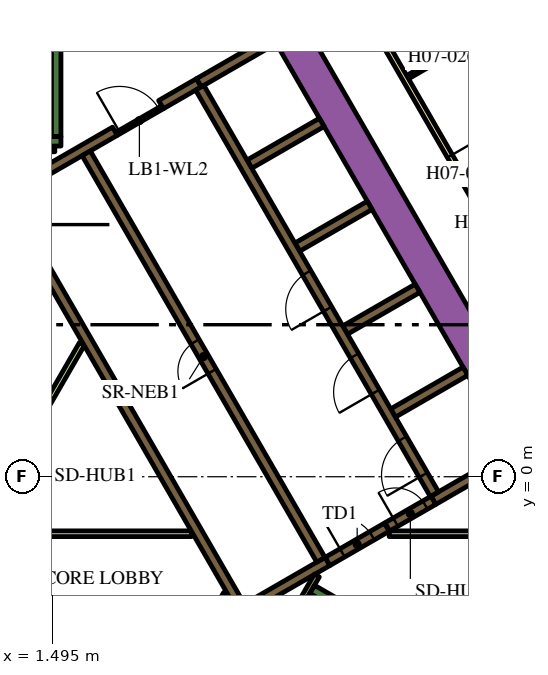
"""IFC4 building model, lengths in metres.
Left out: names, types, materials, properties, quantities, classifications, styles, units other than length and angle.
Written with IfcOpenShell. Run it as: python <this file> out.ifc"""

import sys

from ifc_helpers import new_model, si_unit, direction, frame, frame_2d, origin, place, context, subcontext, project, spatial, polyline, rectangle, outline, extrude, element, fill, save


model = new_model("IFC4")
c1 = context("Model", 3, precision=1e-05, world=origin(), true_north=direction((0.0, 1.0)))
c2 = subcontext(c1, "Body", "Model", "MODEL_VIEW")
j1 = project(units=[si_unit("LENGTHUNIT", "METRE"), si_unit("PLANEANGLEUNIT", "RADIAN")], contexts=[c1])
p1 = place(None, origin())
s1 = spatial("IfcSite", under=j1, at=p1, CompositionType="ELEMENT")
p2 = place(p1, origin())
s2 = spatial("IfcBuilding", under=s1, at=p2, CompositionType="ELEMENT")
p3 = place(p2, frame((0.0, 0.0, 95.4)))
s3 = spatial("IfcBuildingStorey", under=s2, at=p3, CompositionType="ELEMENT", Elevation=95.4)
p4 = place(p3, frame((6.776, 13.364, 0.0), z_axis=(0.0, 0.0, 1.0), x_axis=(0.500004177138, -0.8660229921, 0.0)))
e1 = element("IfcWall", 1, at=p4, inside=s3, PredefinedType="SOLIDWALL", context=c2, shape_type="SweptSolid", body=[
    extrude(rectangle(XDim=20.204, YDim=0.9, at=frame_2d((10.102, 0.0))), origin(), (0.0, 0.0, 1.0), 3.9),
])
p5 = place(p3, frame((8.334, -2.964, 0.0), z_axis=(0.0, 0.0, 1.0), x_axis=(0.866016039709, -0.500016218704, 0.0)))
e2 = element("IfcWall", 2, at=p5, inside=s3, PredefinedType="SOLIDWALL", context=c2, shape_type="SweptSolid", body=[
    extrude(rectangle(XDim=7.05, YDim=0.25, at=frame_2d((3.525, 0.0))), origin(), (0.0, 0.0, 1.0), 3.9),
])
p6 = place(p3, frame((8.168, -3.503, 0.0), z_axis=(0.0, 0.0, 1.0), x_axis=(0.49972245349, 0.866185586049, 0.0)))
e3 = element("IfcWall", 3, at=p6, inside=s3, PredefinedType="SOLIDWALL", context=c2, shape_type="SweptSolid", body=[
    extrude(rectangle(XDim=0.425, YDim=0.25, at=frame_2d((0.212, 0.0))), origin(), (0.0, 0.0, 1.0), 3.9),
])
p7 = place(p3, frame((1.6, 8.95, 0.0), z_axis=(0.0, 0.0, 1.0), x_axis=(0.0, 1.0, 0.0)))
e4 = element("IfcWall", 4, at=p7, inside=s3, PredefinedType="SOLIDWALL", context=c2, shape_type="SweptSolid", body=[
    extrude(rectangle(XDim=6.8, YDim=0.25, at=frame_2d((3.4, 0.0))), origin(), (0.0, 0.0, 1.0), 3.9),
])
p8 = place(p3, frame((1.05, 8.825, 0.0), z_axis=(0.0, 0.0, 1.0), x_axis=(1.0, 0.0, 0.0)))
e5 = element("IfcWall", 5, at=p8, inside=s3, PredefinedType="SOLIDWALL", context=c2, shape_type="SweptSolid", body=[
    extrude(rectangle(XDim=0.675, YDim=0.25, at=frame_2d((0.337, 0.0))), origin(), (0.0, 0.0, 1.0), 3.9),
])
p9 = place(p3, frame((10.464, 1.677, 0.0), z_axis=(0.0, 0.0, 1.0), x_axis=(0.86605622881, 0.499946605688, 0.0)))
e6 = element("IfcWall", 6, at=p9, inside=s3, PredefinedType="SOLIDWALL", context=c2, shape_type="SweptSolid", body=[
    extrude(rectangle(XDim=2.2, YDim=0.25, at=frame_2d((1.1, 0.0))), origin(), (0.0, 0.0, 1.0), 3.9),
])
p10 = place(p3, frame((13.629, 0.594, 0.0), z_axis=(0.0, 0.0, 1.0), x_axis=(-0.866063384774, -0.499934209226, 0.0)))
e7 = element("IfcWall", 7, at=p10, inside=s3, PredefinedType="SOLIDWALL", context=c2, shape_type="SweptSolid", body=[
    extrude(rectangle(XDim=2.428, YDim=0.25, at=frame_2d((1.214, 0.0))), origin(), (0.0, 0.0, 1.0), 3.9),
])
p11 = place(p3, origin())
e8 = element("IfcWall", 8, at=p11, inside=s3, PredefinedType="SOLIDWALL", context=c2, shape_type="SweptSolid", body=[
    extrude(outline(polyline([(0.566, 6.725), (0.566, 6.875), (0.566, 6.875), (0.565, 6.875), (0.361, 6.875), (0.035, 7.439), (0.252, 7.564), (0.377, 7.348), (6.552, -3.348), (6.677, -3.564), (6.46, -3.689), (0.448, 6.725), (0.565, 6.725), (0.566, 6.725), (0.566, 6.725)])), origin(), (0.0, 0.0, 1.0), 3.9),
])
p12 = place(p3, frame((4.358, 9.791, 0.0), z_axis=(0.0, 0.0, 1.0), x_axis=(0.866079547155, 0.499906209203, 0.0)))
e9 = element("IfcWall", 9, at=p12, inside=s3, PredefinedType="SOLIDWALL", context=c2, shape_type="SweptSolid", body=[
    extrude(rectangle(XDim=1.15, YDim=0.25, at=frame_2d((0.575, 0.0))), origin(), (0.0, 0.0, 1.0), 3.9),
])
p13 = place(p3, frame((5.356, 10.367, 0.0), z_axis=(0.0, 0.0, 1.0), x_axis=(0.865978535641, 0.50008116922, 0.0)))
e10 = element("IfcWall", 10, at=p13, inside=s3, PredefinedType="SOLIDWALL", context=c2, shape_type="SweptSolid", body=[
    extrude(rectangle(XDim=2.278, YDim=0.25, at=frame_2d((1.139, 0.0))), origin(), (0.0, 0.0, 1.0), 3.9),
])
p14 = place(p3, frame((0.314, 7.456, 0.0), z_axis=(0.0, 0.0, 1.0), x_axis=(0.866013897511, 0.50001992892, 0.0)))
e11 = element("IfcWall", 11, at=p14, inside=s3, PredefinedType="SOLIDWALL", context=c2, shape_type="SweptSolid", body=[
    extrude(rectangle(XDim=3.268, YDim=0.25, at=frame_2d((1.634, 0.0))), origin(), (0.0, 0.0, 1.0), 3.9),
])
p15 = place(p3, frame((6.614, -3.456, 0.0), z_axis=(0.0, 0.0, 1.0), x_axis=(0.866031582473, 0.499989298045, 0.0)))
e12 = element("IfcWall", 12, at=p15, inside=s3, PredefinedType="SOLIDWALL", context=c2, shape_type="SweptSolid", body=[
    extrude(rectangle(XDim=2.455, YDim=0.25, at=frame_2d((1.228, 0.0))), origin(), (0.0, 0.0, 1.0), 3.9),
])
for number, where, z_axis, x_axis in (
    (13, (6.684, 8.224, 0.0), (0.0, 0.0, 1.0), (0.866, 0.5, 0.0)),
    (14, (7.944, 6.041, 0.0), (0.0, 0.0, 1.0), (0.866, 0.5, 0.0)),
    (15, (9.204, 3.859, 0.0), (0.0, 0.0, 1.0), (0.866, 0.5, 0.0)),
):
    element("IfcWall", number, at=place(p3, frame(where, z_axis=z_axis, x_axis=x_axis)), inside=s3, PredefinedType="SOLIDWALL", context=c2, shape_type="SweptSolid", body=[
        extrude(rectangle(XDim=2.2, YDim=0.25, at=frame_2d((1.1, 0.0))), origin(), (0.0, 0.0, 1.0), 3.9),
    ])
p16 = place(p3, frame((5.705, -3.718, 0.0), z_axis=(0.0, 0.0, 1.0), x_axis=(0.499962090823, 0.866047289552, 0.0)))
e16 = element("IfcWall", 16, at=p16, inside=s3, PredefinedType="PARTITIONING", context=c2, shape_type="SweptSolid", body=[
    extrude(rectangle(XDim=0.735, YDim=0.15, at=frame_2d((0.367, 0.0))), origin(), (0.0, 0.0, 1.0), 2.75),
])
p17 = place(p3, frame((8.459, -2.599, 0.0), z_axis=(0.0, 0.0, 1.0), x_axis=(-0.500041054325, -0.866001699761, 0.0)))
e17 = element("IfcWall", 17, at=p17, inside=s3, PredefinedType="PARTITIONING", context=c2, shape_type="SweptSolid", body=[
    extrude(rectangle(XDim=0.929, YDim=0.15, at=frame_2d((0.464, 0.0))), origin(), (0.0, 0.0, 1.0), 3.9),
])
p18 = place(p3, frame((10.362, -1.5, 0.0), z_axis=(0.0, 0.0, 1.0), x_axis=(1.0, 0.0, 0.0)))
e18 = element("IfcWall", 18, at=p18, inside=s3, PredefinedType="PARTITIONING", context=c2, shape_type="SweptSolid", body=[
    extrude(rectangle(XDim=4.439, YDim=0.15, at=frame_2d((2.22, 0.0))), origin(), (0.0, 0.0, 1.0), 2.75),
])
p19 = place(p3, frame((-4.2, -1.5, 0.0), z_axis=(0.0, 0.0, 1.0), x_axis=(1.0, 0.0, 0.0)))
e19 = element("IfcWall", 19, at=p19, inside=s3, PredefinedType="PARTITIONING", context=c2, shape_type="SweptSolid", body=[
    extrude(rectangle(XDim=9.359, YDim=0.15, at=frame_2d((4.68, 0.0))), origin(), (0.0, 0.0, 1.0), 2.75),
])
p20 = place(p3, frame((1.312, 1.822, 0.0), z_axis=(0.0, 0.0, 1.0), x_axis=(0.500003549559, 0.866023354436, 0.0)))
e20 = element("IfcWall", 20, at=p20, inside=s3, PredefinedType="PARTITIONING", context=c2, shape_type="SweptSolid", body=[
    extrude(rectangle(XDim=1.93, YDim=0.15, at=frame_2d((0.965, 0.0))), origin(), (0.0, 0.0, 1.0), 2.75),
])
p21 = place(p3, frame((1.05, 8.625, 0.0), z_axis=(0.0, 0.0, 1.0), x_axis=(1.0, 0.0, 0.0)))
e21 = element("IfcWall", 21, at=p21, inside=s3, PredefinedType="PARTITIONING", context=c2, shape_type="SweptSolid", body=[
    extrude(rectangle(XDim=0.514, YDim=0.15, at=frame_2d((0.257, 0.0))), origin(), (0.0, 0.0, 1.0), 2.75),
])
p22 = place(p3, frame((11.553, -0.46, 0.0), z_axis=(0.0, 0.0, 1.0), x_axis=(-0.500006514828, 0.866021642414, 0.0)))
e22 = element("IfcWall", 22, at=p22, inside=s3, PredefinedType="SOLIDWALL", context=c2, shape_type="SweptSolid", body=[
    extrude(rectangle(XDim=12.35, YDim=0.25, at=frame_2d((6.175, 0.0))), origin(), (0.0, 0.0, 1.0), 3.9),
])
p23 = place(p22, frame((0.585, 0.0, 0.0)))
e23 = element("IfcOpeningElement", 23, at=p23, cuts=e22, PredefinedType="OPENING", context=c2, shape_type="SweptSolid", body=[
    extrude(rectangle(XDim=1.1, YDim=2.1, at=frame_2d((0.55, 1.05))), frame((0.0, 0.135, 0.0), z_axis=(0.0, -1.0, 0.0), x_axis=(1.0, 0.0, 0.0)), (0.0, 0.0, 1.0), 0.27),
])
p24 = place(p22, frame((3.105, 0.0, 0.0)))
e24 = element("IfcOpeningElement", 24, at=p24, cuts=e22, PredefinedType="OPENING", context=c2, shape_type="SweptSolid", body=[
    extrude(rectangle(XDim=1.1, YDim=2.1, at=frame_2d((0.55, 1.05))), frame((0.0, 0.135, 0.0), z_axis=(0.0, -1.0, 0.0), x_axis=(1.0, 0.0, 0.0)), (0.0, 0.0, 1.0), 0.27),
])
p25 = place(p22, frame((5.625, 0.0, 0.0)))
e25 = element("IfcOpeningElement", 25, at=p25, cuts=e22, PredefinedType="OPENING", context=c2, shape_type="SweptSolid", body=[
    extrude(rectangle(XDim=1.1, YDim=2.1, at=frame_2d((0.55, 1.05))), frame((0.0, 0.135, 0.0), z_axis=(0.0, -1.0, 0.0), x_axis=(1.0, 0.0, 0.0)), (0.0, 0.0, 1.0), 0.27),
])
p26 = place(p3, frame((8.565, -2.185, 0.0), z_axis=(0.0, 0.0, 1.0), x_axis=(-0.499997954832, 0.866026584559, 0.0)))
e26 = element("IfcWall", 26, at=p26, inside=s3, PredefinedType="SOLIDWALL", context=c2, shape_type="SweptSolid", body=[
    extrude(rectangle(XDim=12.35, YDim=0.25, at=frame_2d((6.175, 0.0))), origin(), (0.0, 0.0, 1.0), 3.9),
])
p27 = place(p26, frame((5.725, 0.0, 0.0)))
e27 = element("IfcOpeningElement", 27, at=p27, cuts=e26, PredefinedType="OPENING", context=c2, shape_type="SweptSolid", body=[
    extrude(rectangle(XDim=0.9, YDim=2.1, at=frame_2d((0.45, 1.05))), frame((0.0, 0.135, 0.0), z_axis=(0.0, -1.0, 0.0), x_axis=(1.0, 0.0, 0.0)), (0.0, 0.0, 1.0), 0.27),
])
p28 = place(p3, frame((8.74, -2.229, 0.0), z_axis=(0.0, 0.0, 1.0), x_axis=(0.865989075817, 0.500062916607, 0.0)))
e28 = element("IfcWall", 28, at=p28, inside=s3, PredefinedType="SOLIDWALL", context=c2, shape_type="SweptSolid", body=[
    extrude(rectangle(XDim=1.8, YDim=0.25, at=frame_2d((0.9, 0.0))), origin(), (0.0, 0.0, 1.0), 3.9),
])
p29 = place(p28, frame((0.45, 0.0, 0.0)))
e29 = element("IfcOpeningElement", 29, at=p29, cuts=e28, PredefinedType="OPENING", context=c2, shape_type="SweptSolid", body=[
    extrude(rectangle(XDim=0.9, YDim=2.1, at=frame_2d((0.45, 1.05))), frame((0.0, 0.135, 0.0), z_axis=(0.0, -1.0, 0.0), x_axis=(1.0, 0.0, 0.0)), (0.0, 0.0, 1.0), 0.27),
])
p30 = place(p3, frame((3.183, 9.02, 0.0), z_axis=(0.0, 0.0, 1.0), x_axis=(0.866034573852, 0.49998411664, 0.0)))
e30 = element("IfcWall", 30, at=p30, inside=s3, PredefinedType="PARTITIONING", context=c2, shape_type="SweptSolid", body=[
    extrude(rectangle(XDim=1.4, YDim=0.09, at=frame_2d((0.7, 0.0))), origin(), (0.0, 0.0, 1.0), 2.75),
])
p31 = place(p30, frame((0.1, 0.0, 0.0)))
e31 = element("IfcOpeningElement", 31, at=p31, cuts=e30, PredefinedType="OPENING", context=c2, shape_type="SweptSolid", body=[
    extrude(rectangle(XDim=1.2, YDim=2.1, at=frame_2d((0.6, 1.05))), frame((0.0, 0.055, 0.0), z_axis=(0.0, -1.0, 0.0), x_axis=(1.0, 0.0, 0.0)), (0.0, 0.0, 1.0), 0.11),
])
p32 = place(p3, frame((10.313, -1.32, 0.0), z_axis=(0.0, 0.0, 1.0), x_axis=(0.866034573852, 0.49998411664, 0.0)))
e32 = element("IfcWall", 32, at=p32, inside=s3, PredefinedType="SOLIDWALL", context=c2, shape_type="SweptSolid", body=[
    extrude(rectangle(XDim=1.4, YDim=0.25, at=frame_2d((0.7, 0.0))), origin(), (0.0, 0.0, 1.0), 3.9),
])
p33 = place(p32, frame((0.25, 0.0, 0.0)))
e33 = element("IfcOpeningElement", 33, at=p33, cuts=e32, PredefinedType="OPENING", context=c2, shape_type="SweptSolid", body=[
    extrude(rectangle(XDim=0.9, YDim=2.1, at=frame_2d((0.45, 1.05))), frame((0.0, 0.135, 0.0), z_axis=(0.0, -1.0, 0.0), x_axis=(1.0, 0.0, 0.0)), (0.0, 0.0, 1.0), 0.27),
])
p34 = place(p3, frame((6.163, 18.475, 0.0), z_axis=(0.0, 0.0, 1.0), x_axis=(0.500001317485, -0.866024643133, 0.0)))
e34 = element("IfcWall", 34, at=p34, inside=s3, PredefinedType="PARTITIONING", context=c2, shape_type="SweptSolid", body=[
    extrude(rectangle(XDim=25.767, YDim=0.15, at=frame_2d((12.883, 0.0))), origin(), (0.0, 0.0, 1.0), 2.75),
])
p35 = place(p34, frame((24.241, 0.0, 0.0)))
e35 = element("IfcOpeningElement", 35, at=p35, cuts=e34, PredefinedType="OPENING", context=c2, shape_type="SweptSolid", body=[
    extrude(rectangle(XDim=1.0, YDim=2.1, at=frame_2d((0.5, 1.05))), frame((0.0, 0.085, 0.0), z_axis=(0.0, -1.0, 0.0), x_axis=(1.0, 0.0, 0.0)), (0.0, 0.0, 1.0), 0.17),
])
p36 = place(p34, frame((13.144, 0.0, 0.0)))
e36 = element("IfcOpeningElement", 36, at=p36, cuts=e34, PredefinedType="OPENING", context=c2, shape_type="SweptSolid", body=[
    extrude(rectangle(XDim=1.0, YDim=2.1, at=frame_2d((0.5, 1.05))), frame((0.0, 0.085, 0.0), z_axis=(0.0, -1.0, 0.0), x_axis=(1.0, 0.0, 0.0)), (0.0, 0.0, 1.0), 0.17),
])
p37 = place(p34, frame((11.592, 0.0, 0.0)))
e37 = element("IfcOpeningElement", 37, at=p37, cuts=e34, PredefinedType="OPENING", context=c2, shape_type="SweptSolid", body=[
    extrude(rectangle(XDim=1.1, YDim=2.1, at=frame_2d((0.55, 1.05))), frame((0.0, 0.085, 0.0), z_axis=(0.0, -1.0, 0.0), x_axis=(1.0, 0.0, 0.0)), (0.0, 0.0, 1.0), 0.17),
])
p38 = place(p34, frame((4.674, 0.0, 0.0)))
e38 = element("IfcOpeningElement", 38, at=p38, cuts=e34, PredefinedType="OPENING", context=c2, shape_type="SweptSolid", body=[
    extrude(rectangle(XDim=0.9, YDim=2.1, at=frame_2d((0.45, 1.05))), frame((0.0, 0.085, 0.0), z_axis=(0.0, -1.0, 0.0), x_axis=(1.0, 0.0, 0.0)), (0.0, 0.0, 1.0), 0.17),
])
p39 = place(p34, frame((2.411, 0.0, 0.0)))
e39 = element("IfcOpeningElement", 39, at=p39, cuts=e34, PredefinedType="OPENING", context=c2, shape_type="SweptSolid", body=[
    extrude(rectangle(XDim=1.0, YDim=2.1, at=frame_2d((0.5, 1.05))), frame((0.0, 0.085, 0.0), z_axis=(0.0, -1.0, 0.0), x_axis=(1.0, 0.0, 0.0)), (0.0, 0.0, 1.0), 0.17),
])
p40 = place(p3, frame((10.847, 10.513, 0.0), z_axis=(0.0, 0.0, 1.0), x_axis=(0.865996816683, 0.500049511043, 0.0)))
e40 = element("IfcWall", 40, at=p40, inside=s3, PredefinedType="PARTITIONING", context=c2, shape_type="SweptSolid", body=[
    extrude(rectangle(XDim=2.8, YDim=0.1, at=frame_2d((1.4, 0.0))), origin(), (0.0, 0.0, 1.0), 2.75),
])
p41 = place(p40, frame((0.55, 0.0, 0.0)))
e41 = element("IfcOpeningElement", 41, at=p41, cuts=e40, PredefinedType="OPENING", context=c2, shape_type="SweptSolid", body=[
    extrude(rectangle(XDim=1.0, YDim=2.1, at=frame_2d((0.5, 1.05))), frame((0.0, 0.06, 0.0), z_axis=(0.0, -1.0, 0.0), x_axis=(1.0, 0.0, 0.0)), (0.0, 0.0, 1.0), 0.12),
])
p42 = place(p23, origin())
e42 = element("IfcDoor", 42, at=p42, inside=s3, OperationType="DOUBLE_DOOR_SLIDING", PredefinedType="DOOR", context=c2, shape_type="SweptSolid", body=[
    extrude(rectangle(XDim=1.1, YDim=2.1, at=frame_2d((0.55, 1.05))), frame((0.0, 0.025, 0.0), z_axis=(0.0, -1.0, 0.0), x_axis=(1.0, 0.0, 0.0)), (0.0, 0.0, 1.0), 0.05),
])
fill(e23, e42)
p43 = place(p24, origin())
e43 = element("IfcDoor", 43, at=p43, inside=s3, OperationType="DOUBLE_DOOR_SLIDING", PredefinedType="DOOR", context=c2, shape_type="SweptSolid", body=[
    extrude(rectangle(XDim=1.1, YDim=2.1, at=frame_2d((0.55, 1.05))), frame((0.0, 0.025, 0.0), z_axis=(0.0, -1.0, 0.0), x_axis=(1.0, 0.0, 0.0)), (0.0, 0.0, 1.0), 0.05),
])
fill(e24, e43)
p44 = place(p25, origin())
e44 = element("IfcDoor", 44, at=p44, inside=s3, OperationType="DOUBLE_DOOR_SLIDING", PredefinedType="DOOR", context=c2, shape_type="SweptSolid", body=[
    extrude(rectangle(XDim=1.1, YDim=2.1, at=frame_2d((0.55, 1.05))), frame((0.0, 0.025, 0.0), z_axis=(0.0, -1.0, 0.0), x_axis=(1.0, 0.0, 0.0)), (0.0, 0.0, 1.0), 0.05),
])
fill(e25, e44)
p45 = place(p27, origin())
e45 = element("IfcDoor", 45, at=p45, inside=s3, OperationType="SINGLE_SWING_LEFT", PredefinedType="DOOR", context=c2, shape_type="SweptSolid", body=[
    extrude(rectangle(XDim=0.9, YDim=2.1, at=frame_2d((0.45, 1.05))), frame((0.0, 0.025, 0.0), z_axis=(0.0, -1.0, 0.0), x_axis=(1.0, 0.0, 0.0)), (0.0, 0.0, 1.0), 0.05),
])
fill(e27, e45)
p46 = place(p29, origin())
e46 = element("IfcDoor", 46, at=p46, inside=s3, OperationType="SINGLE_SWING_LEFT", PredefinedType="DOOR", context=c2, shape_type="SweptSolid", body=[
    extrude(rectangle(XDim=0.9, YDim=2.1, at=frame_2d((0.45, 1.05))), frame((0.0, 0.025, 0.0), z_axis=(0.0, -1.0, 0.0), x_axis=(1.0, 0.0, 0.0)), (0.0, 0.0, 1.0), 0.05),
])
fill(e29, e46)
p47 = place(p31, origin())
e47 = element("IfcDoor", 47, at=p47, inside=s3, OperationType="SINGLE_SWING_LEFT", PredefinedType="DOOR", context=c2, shape_type="SweptSolid", body=[
    extrude(rectangle(XDim=1.2, YDim=2.1, at=frame_2d((0.6, 1.05))), frame((0.0, 0.025, 0.0), z_axis=(0.0, -1.0, 0.0), x_axis=(1.0, 0.0, 0.0)), (0.0, 0.0, 1.0), 0.05),
])
fill(e31, e47)
p48 = place(p33, origin())
e48 = element("IfcDoor", 48, at=p48, inside=s3, OperationType="SINGLE_SWING_LEFT", PredefinedType="DOOR", context=c2, shape_type="SweptSolid", body=[
    extrude(rectangle(XDim=0.9, YDim=2.1, at=frame_2d((0.45, 1.05))), frame((0.0, 0.025, 0.0), z_axis=(0.0, -1.0, 0.0), x_axis=(1.0, 0.0, 0.0)), (0.0, 0.0, 1.0), 0.05),
])
fill(e33, e48)
p49 = place(p37, origin())
e49 = element("IfcDoor", 49, at=p49, inside=s3, OperationType="SINGLE_SWING_RIGHT", PredefinedType="DOOR", context=c2, shape_type="SweptSolid", body=[
    extrude(rectangle(XDim=1.1, YDim=2.1, at=frame_2d((0.55, 1.05))), frame((0.0, 0.025, 0.0), z_axis=(0.0, -1.0, 0.0), x_axis=(1.0, 0.0, 0.0)), (0.0, 0.0, 1.0), 0.05),
])
fill(e37, e49)
p50 = place(p41, origin())
e50 = element("IfcDoor", 50, at=p50, inside=s3, OperationType="SINGLE_SWING_LEFT", PredefinedType="DOOR", context=c2, shape_type="SweptSolid", body=[
    extrude(rectangle(XDim=1.0, YDim=2.1, at=frame_2d((0.5, 1.05))), frame((0.0, 0.025, 0.0), z_axis=(0.0, -1.0, 0.0), x_axis=(1.0, 0.0, 0.0)), (0.0, 0.0, 1.0), 0.05),
])
fill(e41, e50)
save(model, sys.argv[1])
